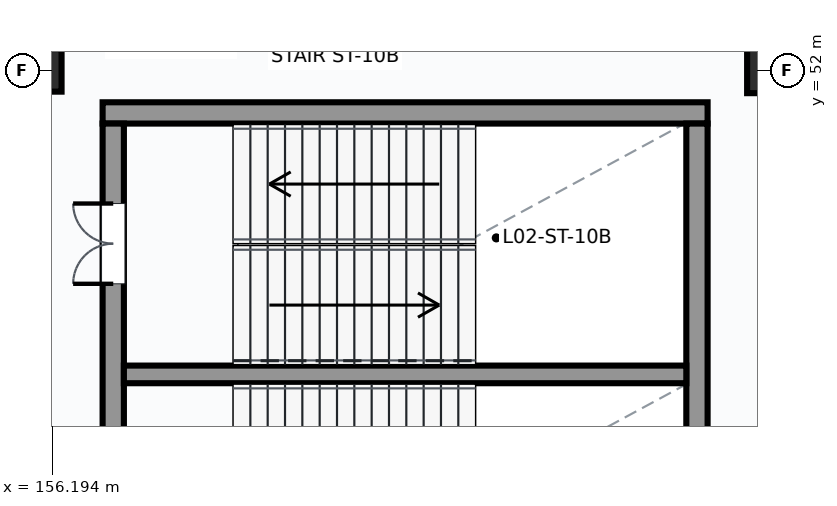
"""IFC4 building model, lengths in metres.
Left out: names, types, materials, properties, quantities, classifications, styles, units other than length and angle.
Written with IfcOpenShell. Run it as: python <this file> out.ifc"""

import sys

from ifc_helpers import new_model, si_unit, direction, frame, frame_2d, origin, origin_2d, place, context, subcontext, project, spatial, rectangle, circle, extrude, element, fill, save


model = new_model("IFC4")
c1 = context("Model", 3, precision=1e-05, world=origin(), true_north=direction((0.0, 1.0)))
c2 = subcontext(c1, "Body", "Model", "MODEL_VIEW")
j1 = project(units=[si_unit("LENGTHUNIT", "METRE"), si_unit("PLANEANGLEUNIT", "RADIAN")], contexts=[c1])
p1 = place(None, origin())
s1 = spatial("IfcSite", under=j1, at=p1, CompositionType="ELEMENT")
p2 = place(p1, origin())
s2 = spatial("IfcBuilding", under=s1, at=p2, CompositionType="ELEMENT")
p3 = place(p2, frame((0.0, 0.0, 10.2)))
s3 = spatial("IfcBuildingStorey", under=s2, at=p3, CompositionType="ELEMENT", Elevation=10.2)
p4 = place(p3, frame((156.0, 52.0, 0.0), z_axis=(0.0, 0.0, 1.0), x_axis=(1.0, 0.0, 0.0)))
e1 = element("IfcColumn", 1, at=p4, inside=s3, PredefinedType="COLUMN", context=c2, shape_type="SweptSolid", body=[
    extrude(circle(Radius=0.35, at=origin_2d()), origin(), (0.0, 0.0, 1.0), 4.5),
])
p5 = place(p3, frame((168.0, 52.0, 0.0), z_axis=(0.0, 0.0, 1.0), x_axis=(1.0, 0.0, 0.0)))
e2 = element("IfcColumn", 2, at=p5, inside=s3, PredefinedType="COLUMN", context=c2, shape_type="SweptSolid", body=[
    extrude(rectangle(XDim=0.75, YDim=0.75, at=origin_2d()), origin(), (0.0, 0.0, 1.0), 4.5),
])
p6 = place(p3, frame((157.025, 51.3, 0.0), z_axis=(0.0, 0.0, 1.0), x_axis=(1.0, 0.0, 0.0)))
e3 = element("IfcWall", 3, at=p6, inside=s3, PredefinedType="SHEAR", context=c2, shape_type="SweptSolid", body=[
    extrude(rectangle(XDim=9.95, YDim=0.35, at=frame_2d((4.975, 0.0))), origin(), (0.0, 0.0, 1.0), 4.5),
])
p7 = place(p3, frame((157.2, 42.875, 0.0), z_axis=(0.0, 0.0, 1.0), x_axis=(0.0, 1.0, 0.0)))
e4 = element("IfcWall", 4, at=p7, inside=s3, PredefinedType="SHEAR", context=c2, shape_type="SweptSolid", body=[
    extrude(rectangle(XDim=8.25, YDim=0.35, at=frame_2d((4.125, 0.0))), origin(), (0.0, 0.0, 1.0), 4.5),
])
p8 = place(p7, frame((1.275, 0.0, 0.0)))
e5 = element("IfcOpeningElement", 5, at=p8, cuts=e4, PredefinedType="OPENING", context=c2, shape_type="SweptSolid", body=[
    extrude(rectangle(XDim=1.4, YDim=2.2, at=frame_2d((0.7, 1.1))), frame((0.0, 0.185, 0.0), z_axis=(0.0, -1.0, 0.0), x_axis=(1.0, 0.0, 0.0)), (0.0, 0.0, 1.0), 0.37),
])
p9 = place(p7, frame((5.615, 0.0, 0.0)))
e6 = element("IfcOpeningElement", 6, at=p9, cuts=e4, PredefinedType="OPENING", context=c2, shape_type="SweptSolid", body=[
    extrude(rectangle(XDim=1.32, YDim=2.2, at=frame_2d((0.66, 1.1))), frame((0.0, 0.185, 0.0), z_axis=(0.0, -1.0, 0.0), x_axis=(1.0, 0.0, 0.0)), (0.0, 0.0, 1.0), 0.37),
])
p10 = place(p3, frame((166.8, 42.875, 0.0), z_axis=(0.0, 0.0, 1.0), x_axis=(0.0, 1.0, 0.0)))
e7 = element("IfcWall", 7, at=p10, inside=s3, PredefinedType="SHEAR", context=c2, shape_type="SweptSolid", body=[
    extrude(rectangle(XDim=8.25, YDim=0.35, at=frame_2d((4.125, 0.0))), origin(), (0.0, 0.0, 1.0), 4.5),
])
p11 = place(p3, frame((157.375, 47.0, 0.0), z_axis=(0.0, 0.0, 1.0), x_axis=(1.0, 0.0, 0.0)))
e8 = element("IfcWall", 8, at=p11, inside=s3, PredefinedType="SHEAR", context=c2, shape_type="SweptSolid", body=[
    extrude(rectangle(XDim=9.25, YDim=0.29, at=frame_2d((4.625, 0.0))), origin(), (0.0, 0.0, 1.0), 4.5),
])
p12 = place(p9, origin())
e9 = element("IfcDoor", 9, at=p12, inside=s3, OperationType="DOUBLE_DOOR_SINGLE_SWING", PredefinedType="DOOR", context=c2, shape_type="SweptSolid", body=[
    extrude(rectangle(XDim=1.32, YDim=2.2, at=frame_2d((0.66, 1.1))), frame((0.0, 0.025, 0.0), z_axis=(0.0, -1.0, 0.0), x_axis=(1.0, 0.0, 0.0)), (0.0, 0.0, 1.0), 0.05),
])
fill(e6, e9)
save(model, sys.argv[1])
